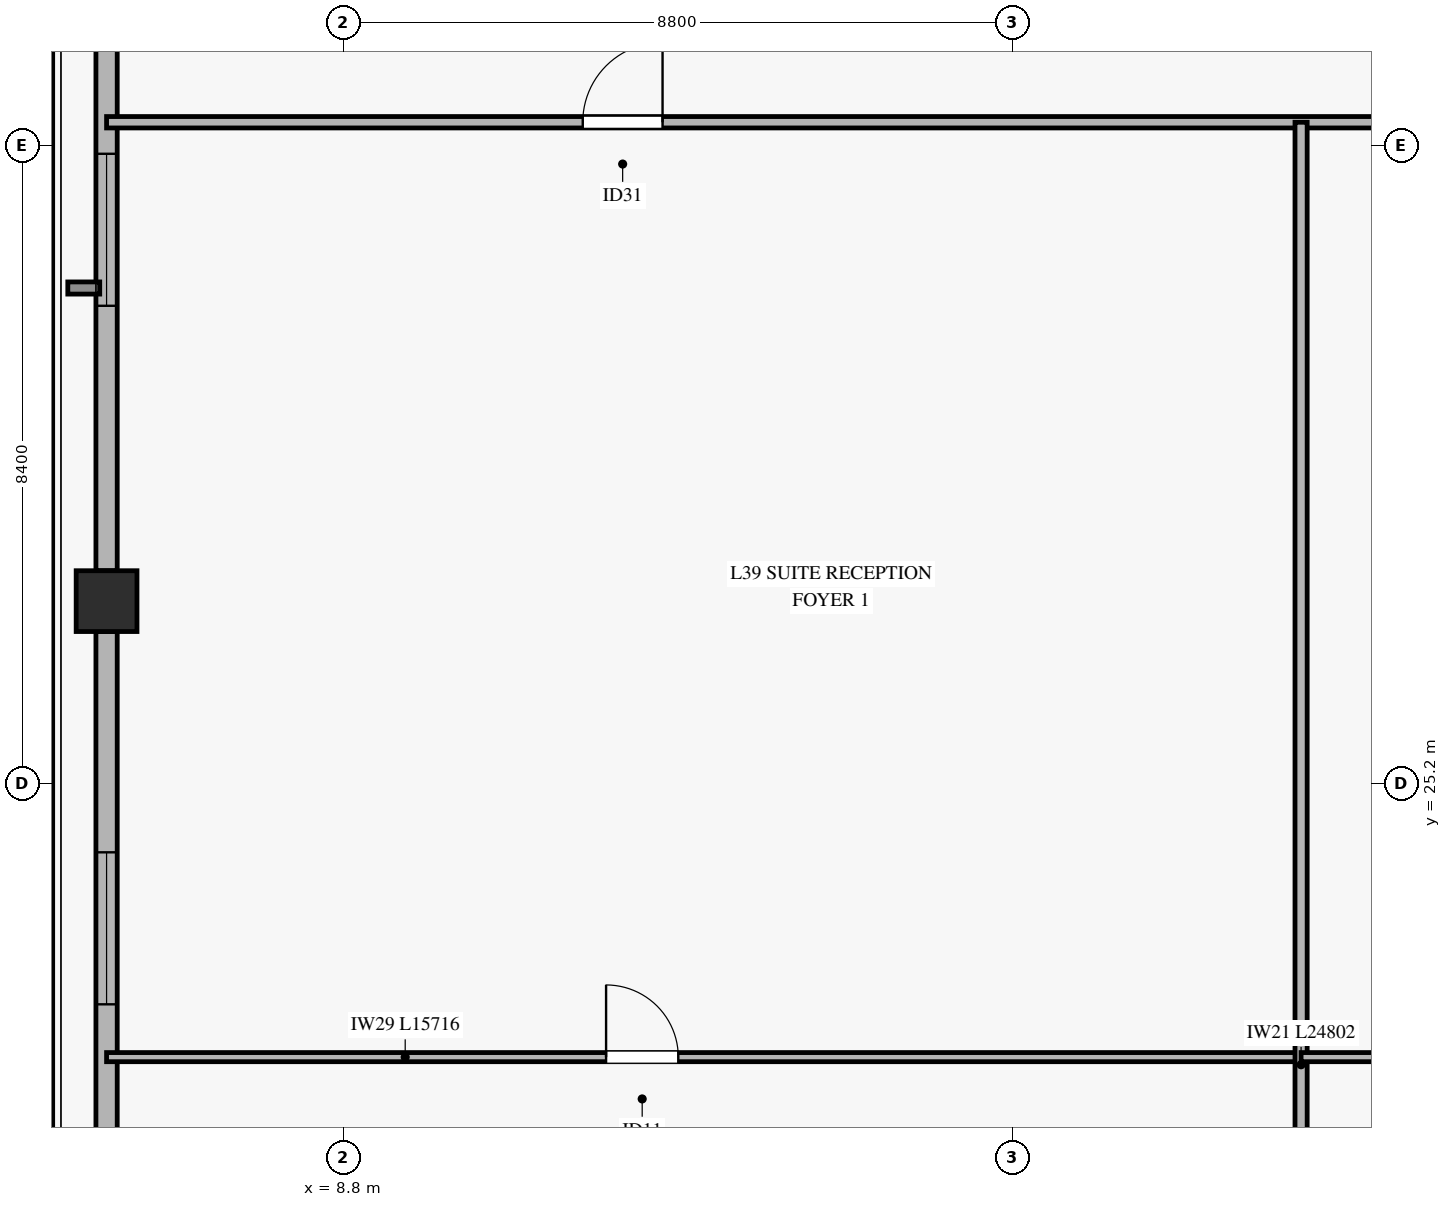
"""IFC4 building model, lengths in metres.
Left out: names, types, materials, properties, quantities, classifications, styles, units other than length and angle.
Written with IfcOpenShell. Run it as: python <this file> out.ifc"""

import sys

from ifc_helpers import new_model, si_unit, direction, frame, frame_2d, origin, origin_2d, place, context, subcontext, project, spatial, rectangle, hollow_rectangle, extrude, source, transform, mapped, element, fill, save


model = new_model("IFC4")
c1 = context("Model", 3, precision=1e-05, world=origin(), true_north=direction((0.0, 1.0)))
c2 = subcontext(c1, "Body", "Model", "MODEL_VIEW")
j1 = project(units=[si_unit("LENGTHUNIT", "METRE"), si_unit("PLANEANGLEUNIT", "RADIAN")], contexts=[c1])
p1 = place(None, origin())
s1 = spatial("IfcSite", under=j1, at=p1, CompositionType="ELEMENT")
p2 = place(p1, origin())
s2 = spatial("IfcBuilding", under=s1, at=p2, CompositionType="ELEMENT")
p3 = place(p2, frame((0.0, 0.0, 159.7)))
s3 = spatial("IfcBuildingStorey", under=s2, at=p3, CompositionType="ELEMENT", Elevation=159.7)
m1 = source(origin(), c2, "Body", "SweptSolid", [
    extrude(hollow_rectangle(XDim=0.8, YDim=0.8, WallThickness=0.036, at=origin_2d()), origin(), (0.0, 0.0, 1.0), 3.27),
])
p4 = place(p3, frame((5.684, 27.599, 0.0), z_axis=(0.0, 0.0, 1.0), x_axis=(1.0, 0.0, 0.0)))
e1 = element("IfcColumn", 1, at=p4, inside=s3, PredefinedType="COLUMN", context=c2, shape_type="MappedRepresentation", body=[
    mapped(m1, transform((0.0, 0.0, 0.0), x_axis=(1.0, 0.0, 0.0), y_axis=(0.0, 1.0, 0.0), z_axis=(0.0, 0.0, 1.0), scale=1.0)),
])
p5 = place(p3, frame((5.684, 12.011, 0.0), z_axis=(0.0, 0.0, 1.0), x_axis=(0.0, 1.0, 0.0)))
e2 = element("IfcWall", 2, at=p5, inside=s3, PredefinedType="SOLIDWALL", context=c2, shape_type="SweptSolid", body=[
    extrude(rectangle(XDim=15.188, YDim=0.28, at=frame_2d((7.594, 0.0))), origin(), (0.0, 0.0, 1.0), 2.75),
])
p6 = place(p5, frame((3.189, 0.0, 0.45)))
e3 = element("IfcOpeningElement", 3, at=p6, cuts=e2, PredefinedType="OPENING", context=c2, shape_type="SweptSolid", body=[
    extrude(rectangle(XDim=2.0, YDim=2.0, at=frame_2d((1.0, 1.0))), frame((0.0, 0.15, 0.0), z_axis=(0.0, -1.0, 0.0), x_axis=(1.0, 0.0, 0.0)), (0.0, 0.0, 1.0), 0.3),
])
p7 = place(p5, frame((10.283, 0.0, 0.45)))
e4 = element("IfcOpeningElement", 4, at=p7, cuts=e2, PredefinedType="OPENING", context=c2, shape_type="SweptSolid", body=[
    extrude(rectangle(XDim=2.0, YDim=2.0, at=frame_2d((1.0, 1.0))), frame((0.0, 0.15, 0.0), z_axis=(0.0, -1.0, 0.0), x_axis=(1.0, 0.0, 0.0)), (0.0, 0.0, 1.0), 0.3),
])
p8 = place(p3, frame((5.684, 27.999, 0.0), z_axis=(0.0, 0.0, 1.0), x_axis=(0.0, 1.0, 0.0)))
e5 = element("IfcWall", 5, at=p8, inside=s3, PredefinedType="SOLIDWALL", context=c2, shape_type="SweptSolid", body=[
    extrude(rectangle(XDim=15.188, YDim=0.28, at=frame_2d((7.594, 0.0))), origin(), (0.0, 0.0, 1.0), 2.75),
])
p9 = place(p8, frame((3.486, 0.0, 0.45)))
e6 = element("IfcOpeningElement", 6, at=p9, cuts=e5, PredefinedType="OPENING", context=c2, shape_type="SweptSolid", body=[
    extrude(rectangle(XDim=2.0, YDim=2.0, at=frame_2d((1.0, 1.0))), frame((0.0, 0.15, 0.0), z_axis=(0.0, -1.0, 0.0), x_axis=(1.0, 0.0, 0.0)), (0.0, 0.0, 1.0), 0.3),
])
p10 = place(p3, frame((5.684, 33.9, 0.0), z_axis=(0.0, 0.0, 1.0), x_axis=(1.0, 0.0, 0.0)))
e7 = element("IfcWall", 7, at=p10, inside=s3, PredefinedType="PARTITIONING", context=c2, shape_type="SweptSolid", body=[
    extrude(rectangle(XDim=59.032, YDim=0.15, at=frame_2d((29.516, 0.0))), origin(), (0.0, 0.0, 1.0), 2.455),
])
p11 = place(p10, frame((6.265, 0.0, 0.0)))
e8 = element("IfcOpeningElement", 8, at=p11, cuts=e7, PredefinedType="OPENING", context=c2, shape_type="SweptSolid", body=[
    extrude(rectangle(XDim=1.05, YDim=2.15, at=frame_2d((0.525, 1.075))), frame((0.0, 0.085, 0.0), z_axis=(0.0, -1.0, 0.0), x_axis=(1.0, 0.0, 0.0)), (0.0, 0.0, 1.0), 0.17),
])
p12 = place(p10, frame((18.469, 0.0, 0.0)))
e9 = element("IfcOpeningElement", 9, at=p12, cuts=e7, PredefinedType="OPENING", context=c2, shape_type="SweptSolid", body=[
    extrude(rectangle(XDim=1.05, YDim=2.15, at=frame_2d((0.525, 1.075))), frame((0.0, 0.085, 0.0), z_axis=(0.0, -1.0, 0.0), x_axis=(1.0, 0.0, 0.0)), (0.0, 0.0, 1.0), 0.17),
])
p13 = place(p10, frame((24.661, 0.0, 0.0)))
e10 = element("IfcOpeningElement", 10, at=p13, cuts=e7, PredefinedType="OPENING", context=c2, shape_type="SweptSolid", body=[
    extrude(rectangle(XDim=1.05, YDim=2.15, at=frame_2d((0.525, 1.075))), frame((0.0, 0.085, 0.0), z_axis=(0.0, -1.0, 0.0), x_axis=(1.0, 0.0, 0.0)), (0.0, 0.0, 1.0), 0.17),
])
p14 = place(p10, frame((30.152, 0.0, 0.0)))
e11 = element("IfcOpeningElement", 11, at=p14, cuts=e7, PredefinedType="OPENING", context=c2, shape_type="SweptSolid", body=[
    extrude(rectangle(XDim=1.05, YDim=2.15, at=frame_2d((0.525, 1.075))), frame((0.0, 0.085, 0.0), z_axis=(0.0, -1.0, 0.0), x_axis=(1.0, 0.0, 0.0)), (0.0, 0.0, 1.0), 0.17),
])
p15 = place(p10, frame((35.352, 0.0, 0.0)))
e12 = element("IfcOpeningElement", 12, at=p15, cuts=e7, PredefinedType="OPENING", context=c2, shape_type="SweptSolid", body=[
    extrude(rectangle(XDim=1.05, YDim=2.15, at=frame_2d((0.525, 1.075))), frame((0.0, 0.085, 0.0), z_axis=(0.0, -1.0, 0.0), x_axis=(1.0, 0.0, 0.0)), (0.0, 0.0, 1.0), 0.17),
])
p16 = place(p10, frame((46.157, 0.0, 0.0)))
e13 = element("IfcOpeningElement", 13, at=p16, cuts=e7, PredefinedType="OPENING", context=c2, shape_type="SweptSolid", body=[
    extrude(rectangle(XDim=1.05, YDim=2.15, at=frame_2d((0.525, 1.075))), frame((0.0, 0.085, 0.0), z_axis=(0.0, -1.0, 0.0), x_axis=(1.0, 0.0, 0.0)), (0.0, 0.0, 1.0), 0.17),
])
p17 = place(p3, frame((5.684, 21.599, 0.0), z_axis=(0.0, 0.0, 1.0), x_axis=(1.0, 0.0, 0.0)))
e14 = element("IfcWall", 14, at=p17, inside=s3, PredefinedType="PARTITIONING", context=c2, shape_type="SweptSolid", body=[
    extrude(rectangle(XDim=15.716, YDim=0.12, at=frame_2d((7.858, 0.0))), origin(), (0.0, 0.0, 1.0), 2.455),
])
p18 = place(p17, frame((6.572, 0.0, 0.0)))
e15 = element("IfcOpeningElement", 15, at=p18, cuts=e14, PredefinedType="OPENING", context=c2, shape_type="SweptSolid", body=[
    extrude(rectangle(XDim=0.95, YDim=2.1, at=frame_2d((0.475, 1.05))), frame((0.0, 0.07, 0.0), z_axis=(0.0, -1.0, 0.0), x_axis=(1.0, 0.0, 0.0)), (0.0, 0.0, 1.0), 0.14),
])
p19 = place(p3, frame((21.4, 9.098, 0.0), z_axis=(0.0, 0.0, 1.0), x_axis=(0.0, 1.0, 0.0)))
e16 = element("IfcWall", 16, at=p19, inside=s3, PredefinedType="PARTITIONING", context=c2, shape_type="SweptSolid", body=[
    extrude(rectangle(XDim=24.802, YDim=0.16, at=frame_2d((12.401, 0.0))), origin(), (0.0, 0.0, 1.0), 2.755),
])
p20 = place(p3, frame((21.4, 21.599, 0.0), z_axis=(0.0, 0.0, 1.0), x_axis=(1.0, 0.0, 0.0)))
e17 = element("IfcWall", 17, at=p20, inside=s3, PredefinedType="PARTITIONING", context=c2, shape_type="SweptSolid", body=[
    extrude(rectangle(XDim=6.8, YDim=0.12, at=frame_2d((3.4, 0.0))), origin(), (0.0, 0.0, 1.0), 3.27),
])
p21 = place(p20, frame((2.886, 0.0, 0.0)))
e18 = element("IfcOpeningElement", 18, at=p21, cuts=e17, PredefinedType="OPENING", context=c2, shape_type="SweptSolid", body=[
    extrude(rectangle(XDim=0.95, YDim=2.1, at=frame_2d((0.475, 1.05))), frame((0.0, 0.07, 0.0), z_axis=(0.0, -1.0, 0.0), x_axis=(1.0, 0.0, 0.0)), (0.0, 0.0, 1.0), 0.14),
])
m2 = source(origin(), c2, "Body", "SweptSolid", [
    extrude(rectangle(XDim=2.0, YDim=2.0, at=frame_2d((1.0, 1.0))), frame((0.0, 0.03, 0.0), z_axis=(0.0, -1.0, 0.0), x_axis=(1.0, 0.0, 0.0)), (0.0, 0.0, 1.0), 0.06),
])
p22 = place(p7, origin())
e19 = element("IfcWindow", 19, at=p22, inside=s3, PartitioningType="SINGLE_PANEL", PredefinedType="WINDOW", context=c2, shape_type="MappedRepresentation", body=[
    mapped(m2, transform((0.0, 0.0, 0.0), x_axis=(1.0, 0.0, 0.0), y_axis=(0.0, 1.0, 0.0), z_axis=(0.0, 0.0, 1.0), scale=1.0)),
])
fill(e4, e19)
p23 = place(p9, origin())
e20 = element("IfcWindow", 20, at=p23, inside=s3, PartitioningType="SINGLE_PANEL", PredefinedType="WINDOW", context=c2, shape_type="MappedRepresentation", body=[
    mapped(m2, transform((0.0, 0.0, 0.0), x_axis=(1.0, 0.0, 0.0), y_axis=(0.0, 1.0, 0.0), z_axis=(0.0, 0.0, 1.0), scale=1.0)),
])
fill(e6, e20)
m3 = source(origin(), c2, "Body", "SweptSolid", [
    extrude(rectangle(XDim=1.05, YDim=2.15, at=frame_2d((0.525, 1.075))), frame((0.0, 0.025, 0.0), z_axis=(0.0, -1.0, 0.0), x_axis=(1.0, 0.0, 0.0)), (0.0, 0.0, 1.0), 0.05),
])
p24 = place(p11, origin())
e21 = element("IfcDoor", 21, at=p24, inside=s3, OperationType="SINGLE_SWING_RIGHT", PredefinedType="DOOR", context=c2, shape_type="MappedRepresentation", body=[
    mapped(m3, transform((0.0, 0.0, 0.0), x_axis=(1.0, 0.0, 0.0), y_axis=(0.0, 1.0, 0.0), z_axis=(0.0, 0.0, 1.0), scale=1.0)),
])
fill(e8, e21)
m4 = source(origin(), c2, "Body", "SweptSolid", [
    extrude(rectangle(XDim=0.95, YDim=2.1, at=frame_2d((0.475, 1.05))), frame((0.0, 0.025, 0.0), z_axis=(0.0, -1.0, 0.0), x_axis=(1.0, 0.0, 0.0)), (0.0, 0.0, 1.0), 0.05),
])
p25 = place(p18, origin())
e22 = element("IfcDoor", 22, at=p25, inside=s3, OperationType="SINGLE_SWING_LEFT", PredefinedType="DOOR", context=c2, shape_type="MappedRepresentation", body=[
    mapped(m4, transform((0.0, 0.0, 0.0), x_axis=(1.0, 0.0, 0.0), y_axis=(0.0, 1.0, 0.0), z_axis=(0.0, 0.0, 1.0), scale=1.0)),
])
fill(e15, e22)
save(model, sys.argv[1])
